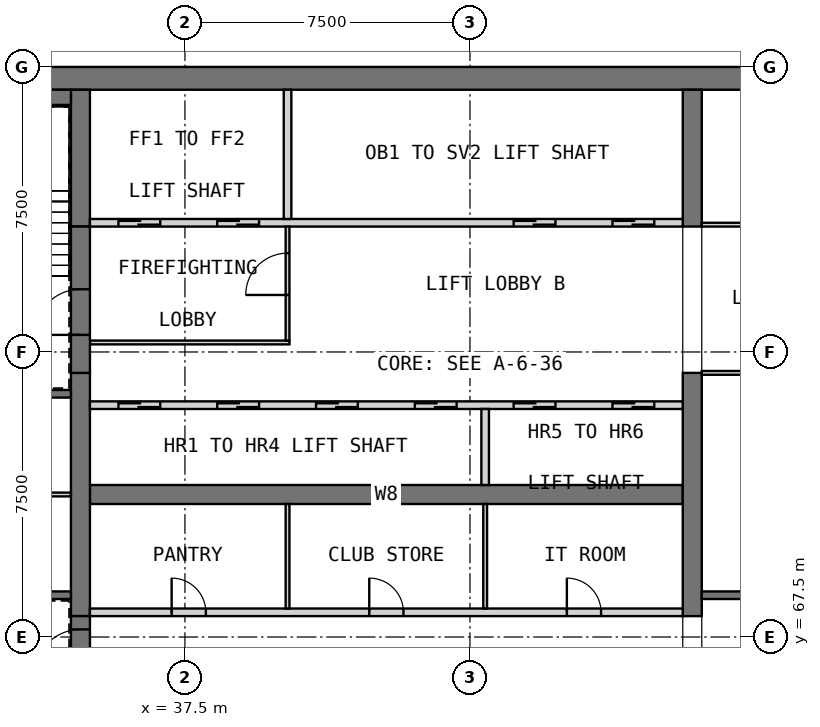
"""IFC4 building model, lengths in metres.
Left out: names, types, materials, properties, quantities, classifications, styles, units other than length and angle.
Written with IfcOpenShell. Run it as: python <this file> out.ifc"""

import sys

from ifc_helpers import new_model, si_unit, direction, frame, frame_2d, origin, place, context, subcontext, project, spatial, rectangle, extrude, element, fill, save


model = new_model("IFC4")
c1 = context("Model", 3, precision=1e-05, world=origin(), true_north=direction((0.0, 1.0)))
c2 = subcontext(c1, "Body", "Model", "MODEL_VIEW")
j1 = project(units=[si_unit("LENGTHUNIT", "METRE"), si_unit("PLANEANGLEUNIT", "RADIAN")], contexts=[c1])
p1 = place(None, origin())
s1 = spatial("IfcSite", under=j1, at=p1, CompositionType="ELEMENT")
p2 = place(p1, origin())
s2 = spatial("IfcBuilding", under=s1, at=p2, CompositionType="ELEMENT")
p3 = place(p2, frame((0.0, 0.0, 287.2)))
s3 = spatial("IfcBuildingStorey", under=s2, at=p3, CompositionType="ELEMENT", Elevation=287.2)
p4 = place(p3, frame((30.0, 82.2, 0.0), z_axis=(0.0, 0.0, 1.0), x_axis=(1.0, 0.0, 0.0)))
e1 = element("IfcWall", 1, at=p4, inside=s3, PredefinedType="SHEAR", context=c2, shape_type="SweptSolid", body=[
    extrude(rectangle(XDim=30.0, YDim=0.6, at=frame_2d((15.0, 0.0))), origin(), (0.0, 0.0, 1.0), 5.0),
])
p5 = place(p3, frame((35.0, 71.25, 0.0), z_axis=(0.0, 0.0, 1.0), x_axis=(1.0, 0.0, 0.0)))
e2 = element("IfcWall", 2, at=p5, inside=s3, PredefinedType="SHEAR", context=c2, shape_type="SweptSolid", body=[
    extrude(rectangle(XDim=15.6, YDim=0.5, at=frame_2d((7.8, 0.0))), origin(), (0.0, 0.0, 1.0), 5.0),
])
p6 = place(p3, frame((34.75, 68.05, 0.0), z_axis=(0.0, 0.0, 1.0), x_axis=(0.0, 1.0, 0.0)))
e3 = element("IfcWall", 3, at=p6, inside=s3, PredefinedType="SHEAR", context=c2, shape_type="SweptSolid", body=[
    extrude(rectangle(XDim=6.4, YDim=0.5, at=frame_2d((3.2, 0.0))), origin(), (0.0, 0.0, 1.0), 5.0),
])
p7 = place(p3, frame((34.75, 78.3, 0.0), z_axis=(0.0, 0.0, 1.0), x_axis=(0.0, 1.0, 0.0)))
e4 = element("IfcWall", 4, at=p7, inside=s3, PredefinedType="SHEAR", context=c2, shape_type="SweptSolid", body=[
    extrude(rectangle(XDim=3.6, YDim=0.5, at=frame_2d((1.8, 0.0))), origin(), (0.0, 0.0, 1.0), 5.0),
])
p8 = place(p3, frame((50.85, 68.05, 0.0), z_axis=(0.0, 0.0, 1.0), x_axis=(0.0, 1.0, 0.0)))
e5 = element("IfcWall", 5, at=p8, inside=s3, PredefinedType="SHEAR", context=c2, shape_type="SweptSolid", body=[
    extrude(rectangle(XDim=6.4, YDim=0.5, at=frame_2d((3.2, 0.0))), origin(), (0.0, 0.0, 1.0), 5.0),
])
p9 = place(p3, frame((50.85, 78.3, 0.0), z_axis=(0.0, 0.0, 1.0), x_axis=(0.0, 1.0, 0.0)))
e6 = element("IfcWall", 6, at=p9, inside=s3, PredefinedType="SHEAR", context=c2, shape_type="SweptSolid", body=[
    extrude(rectangle(XDim=3.6, YDim=0.5, at=frame_2d((1.8, 0.0))), origin(), (0.0, 0.0, 1.0), 5.0),
])
p10 = place(p3, frame((35.0, 68.15, 0.0), z_axis=(0.0, 0.0, 1.0), x_axis=(1.0, 0.0, 0.0)))
e7 = element("IfcWall", 7, at=p10, inside=s3, PredefinedType="PARTITIONING", context=c2, shape_type="SweptSolid", body=[
    extrude(rectangle(XDim=15.6, YDim=0.2, at=frame_2d((7.8, 0.0))), origin(), (0.0, 0.0, 1.0), 4.7),
])
p11 = place(p10, frame((2.15, 0.0, 0.0)))
e8 = element("IfcOpeningElement", 8, at=p11, cuts=e7, PredefinedType="OPENING", context=c2, shape_type="SweptSolid", body=[
    extrude(rectangle(XDim=0.9, YDim=2.1, at=frame_2d((0.45, 1.05))), frame((0.0, 0.11, 0.0), z_axis=(0.0, -1.0, 0.0), x_axis=(1.0, 0.0, 0.0)), (0.0, 0.0, 1.0), 0.22),
])
p12 = place(p10, frame((7.35, 0.0, 0.0)))
e9 = element("IfcOpeningElement", 9, at=p12, cuts=e7, PredefinedType="OPENING", context=c2, shape_type="SweptSolid", body=[
    extrude(rectangle(XDim=0.9, YDim=2.1, at=frame_2d((0.45, 1.05))), frame((0.0, 0.11, 0.0), z_axis=(0.0, -1.0, 0.0), x_axis=(1.0, 0.0, 0.0)), (0.0, 0.0, 1.0), 0.22),
])
p13 = place(p10, frame((12.55, 0.0, 0.0)))
e10 = element("IfcOpeningElement", 10, at=p13, cuts=e7, PredefinedType="OPENING", context=c2, shape_type="SweptSolid", body=[
    extrude(rectangle(XDim=0.9, YDim=2.1, at=frame_2d((0.45, 1.05))), frame((0.0, 0.11, 0.0), z_axis=(0.0, -1.0, 0.0), x_axis=(1.0, 0.0, 0.0)), (0.0, 0.0, 1.0), 0.22),
])
for number, where, z_axis, x_axis in (
    (11, (40.2, 68.25, 0.0), (0.0, 0.0, 1.0), (0.0, 1.0, 0.0)),
    (12, (45.4, 68.25, 0.0), (0.0, 0.0, 1.0), (0.0, 1.0, 0.0)),
):
    element("IfcWall", number, at=place(p3, frame(where, z_axis=z_axis, x_axis=x_axis)), inside=s3, PredefinedType="PARTITIONING", context=c2, shape_type="SweptSolid", body=[
        extrude(rectangle(XDim=2.75, YDim=0.1, at=frame_2d((1.375, 0.0))), origin(), (0.0, 0.0, 1.0), 4.7),
    ])
p14 = place(p3, frame((35.0, 73.6, 0.0), z_axis=(0.0, 0.0, 1.0), x_axis=(1.0, 0.0, 0.0)))
e13 = element("IfcWall", 13, at=p14, inside=s3, PredefinedType="SOLIDWALL", context=c2, shape_type="SweptSolid", body=[
    extrude(rectangle(XDim=15.6, YDim=0.2, at=frame_2d((7.8, 0.0))), origin(), (0.0, 0.0, 1.0), 5.0),
])
p15 = place(p14, frame((0.75, 0.0, 0.0)))
e14 = element("IfcOpeningElement", 14, at=p15, cuts=e13, PredefinedType="OPENING", context=c2, shape_type="SweptSolid", body=[
    extrude(rectangle(XDim=1.1, YDim=2.1, at=frame_2d((0.55, 1.05))), frame((0.0, 0.11, 0.0), z_axis=(0.0, -1.0, 0.0), x_axis=(1.0, 0.0, 0.0)), (0.0, 0.0, 1.0), 0.22),
])
p16 = place(p14, frame((3.35, 0.0, 0.0)))
e15 = element("IfcOpeningElement", 15, at=p16, cuts=e13, PredefinedType="OPENING", context=c2, shape_type="SweptSolid", body=[
    extrude(rectangle(XDim=1.1, YDim=2.1, at=frame_2d((0.55, 1.05))), frame((0.0, 0.11, 0.0), z_axis=(0.0, -1.0, 0.0), x_axis=(1.0, 0.0, 0.0)), (0.0, 0.0, 1.0), 0.22),
])
p17 = place(p14, frame((5.95, 0.0, 0.0)))
e16 = element("IfcOpeningElement", 16, at=p17, cuts=e13, PredefinedType="OPENING", context=c2, shape_type="SweptSolid", body=[
    extrude(rectangle(XDim=1.1, YDim=2.1, at=frame_2d((0.55, 1.05))), frame((0.0, 0.11, 0.0), z_axis=(0.0, -1.0, 0.0), x_axis=(1.0, 0.0, 0.0)), (0.0, 0.0, 1.0), 0.22),
])
p18 = place(p14, frame((8.55, 0.0, 0.0)))
e17 = element("IfcOpeningElement", 17, at=p18, cuts=e13, PredefinedType="OPENING", context=c2, shape_type="SweptSolid", body=[
    extrude(rectangle(XDim=1.1, YDim=2.1, at=frame_2d((0.55, 1.05))), frame((0.0, 0.11, 0.0), z_axis=(0.0, -1.0, 0.0), x_axis=(1.0, 0.0, 0.0)), (0.0, 0.0, 1.0), 0.22),
])
p19 = place(p14, frame((11.15, 0.0, 0.0)))
e18 = element("IfcOpeningElement", 18, at=p19, cuts=e13, PredefinedType="OPENING", context=c2, shape_type="SweptSolid", body=[
    extrude(rectangle(XDim=1.1, YDim=2.1, at=frame_2d((0.55, 1.05))), frame((0.0, 0.11, 0.0), z_axis=(0.0, -1.0, 0.0), x_axis=(1.0, 0.0, 0.0)), (0.0, 0.0, 1.0), 0.22),
])
p20 = place(p14, frame((13.75, 0.0, 0.0)))
e19 = element("IfcOpeningElement", 19, at=p20, cuts=e13, PredefinedType="OPENING", context=c2, shape_type="SweptSolid", body=[
    extrude(rectangle(XDim=1.1, YDim=2.1, at=frame_2d((0.55, 1.05))), frame((0.0, 0.11, 0.0), z_axis=(0.0, -1.0, 0.0), x_axis=(1.0, 0.0, 0.0)), (0.0, 0.0, 1.0), 0.22),
])
p21 = place(p3, frame((45.4, 71.5, 0.0), z_axis=(0.0, 0.0, 1.0), x_axis=(0.0, 1.0, 0.0)))
e20 = element("IfcWall", 20, at=p21, inside=s3, PredefinedType="SOLIDWALL", context=c2, shape_type="SweptSolid", body=[
    extrude(rectangle(XDim=2.0, YDim=0.2, at=frame_2d((1.0, 0.0))), origin(), (0.0, 0.0, 1.0), 5.0),
])
p22 = place(p3, frame((35.0, 78.4, 0.0), z_axis=(0.0, 0.0, 1.0), x_axis=(1.0, 0.0, 0.0)))
e21 = element("IfcWall", 21, at=p22, inside=s3, PredefinedType="SOLIDWALL", context=c2, shape_type="SweptSolid", body=[
    extrude(rectangle(XDim=15.6, YDim=0.2, at=frame_2d((7.8, 0.0))), origin(), (0.0, 0.0, 1.0), 5.0),
])
p23 = place(p22, frame((0.75, 0.0, 0.0)))
e22 = element("IfcOpeningElement", 22, at=p23, cuts=e21, PredefinedType="OPENING", context=c2, shape_type="SweptSolid", body=[
    extrude(rectangle(XDim=1.1, YDim=2.1, at=frame_2d((0.55, 1.05))), frame((0.0, 0.11, 0.0), z_axis=(0.0, -1.0, 0.0), x_axis=(1.0, 0.0, 0.0)), (0.0, 0.0, 1.0), 0.22),
])
p24 = place(p22, frame((3.35, 0.0, 0.0)))
e23 = element("IfcOpeningElement", 23, at=p24, cuts=e21, PredefinedType="OPENING", context=c2, shape_type="SweptSolid", body=[
    extrude(rectangle(XDim=1.1, YDim=2.1, at=frame_2d((0.55, 1.05))), frame((0.0, 0.11, 0.0), z_axis=(0.0, -1.0, 0.0), x_axis=(1.0, 0.0, 0.0)), (0.0, 0.0, 1.0), 0.22),
])
p25 = place(p22, frame((11.15, 0.0, 0.0)))
e24 = element("IfcOpeningElement", 24, at=p25, cuts=e21, PredefinedType="OPENING", context=c2, shape_type="SweptSolid", body=[
    extrude(rectangle(XDim=1.1, YDim=2.1, at=frame_2d((0.55, 1.05))), frame((0.0, 0.11, 0.0), z_axis=(0.0, -1.0, 0.0), x_axis=(1.0, 0.0, 0.0)), (0.0, 0.0, 1.0), 0.22),
])
p26 = place(p22, frame((13.75, 0.0, 0.0)))
e25 = element("IfcOpeningElement", 25, at=p26, cuts=e21, PredefinedType="OPENING", context=c2, shape_type="SweptSolid", body=[
    extrude(rectangle(XDim=1.1, YDim=2.1, at=frame_2d((0.55, 1.05))), frame((0.0, 0.11, 0.0), z_axis=(0.0, -1.0, 0.0), x_axis=(1.0, 0.0, 0.0)), (0.0, 0.0, 1.0), 0.22),
])
p27 = place(p3, frame((40.2, 78.5, 0.0), z_axis=(0.0, 0.0, 1.0), x_axis=(0.0, 1.0, 0.0)))
e26 = element("IfcWall", 26, at=p27, inside=s3, PredefinedType="SOLIDWALL", context=c2, shape_type="SweptSolid", body=[
    extrude(rectangle(XDim=3.4, YDim=0.2, at=frame_2d((1.7, 0.0))), origin(), (0.0, 0.0, 1.0), 5.0),
])
p28 = place(p3, frame((35.0, 75.25, 0.0), z_axis=(0.0, 0.0, 1.0), x_axis=(1.0, 0.0, 0.0)))
e27 = element("IfcWall", 27, at=p28, inside=s3, PredefinedType="PARTITIONING", context=c2, shape_type="SweptSolid", body=[
    extrude(rectangle(XDim=5.25, YDim=0.1, at=frame_2d((2.625, 0.0))), origin(), (0.0, 0.0, 1.0), 4.7),
])
p29 = place(p3, frame((40.2, 75.3, 0.0), z_axis=(0.0, 0.0, 1.0), x_axis=(0.0, 1.0, 0.0)))
e28 = element("IfcWall", 28, at=p29, inside=s3, PredefinedType="PARTITIONING", context=c2, shape_type="SweptSolid", body=[
    extrude(rectangle(XDim=3.0, YDim=0.1, at=frame_2d((1.5, 0.0))), origin(), (0.0, 0.0, 1.0), 4.7),
])
p30 = place(p29, frame((1.2, 0.0, 0.0)))
e29 = element("IfcOpeningElement", 29, at=p30, cuts=e28, PredefinedType="OPENING", context=c2, shape_type="SweptSolid", body=[
    extrude(rectangle(XDim=1.1, YDim=2.1, at=frame_2d((0.55, 1.05))), frame((0.0, 0.06, 0.0), z_axis=(0.0, -1.0, 0.0), x_axis=(1.0, 0.0, 0.0)), (0.0, 0.0, 1.0), 0.12),
])
p31 = place(p3, frame((34.75, 64.2, 0.0), z_axis=(0.0, 0.0, 1.0), x_axis=(0.0, 1.0, 0.0)))
e30 = element("IfcWall", 30, at=p31, inside=s3, PredefinedType="SOLIDWALL", context=c2, shape_type="SweptSolid", body=[
    extrude(rectangle(XDim=3.85, YDim=0.5, at=frame_2d((1.925, 0.0))), origin(), (0.0, 0.0, 1.0), 3.8),
])
p32 = place(p31, frame((2.3, 0.0, 0.0)))
e31 = element("IfcOpeningElement", 31, at=p32, cuts=e30, PredefinedType="OPENING", context=c2, shape_type="SweptSolid", body=[
    extrude(rectangle(XDim=1.2, YDim=2.1, at=frame_2d((0.6, 1.05))), frame((0.0, 0.26, 0.0), z_axis=(0.0, -1.0, 0.0), x_axis=(1.0, 0.0, 0.0)), (0.0, 0.0, 1.0), 0.52),
])
p33 = place(p3, frame((34.75, 74.45, 0.0), z_axis=(0.0, 0.0, 1.0), x_axis=(0.0, 1.0, 0.0)))
e32 = element("IfcWall", 32, at=p33, inside=s3, PredefinedType="SOLIDWALL", context=c2, shape_type="SweptSolid", body=[
    extrude(rectangle(XDim=3.85, YDim=0.5, at=frame_2d((1.925, 0.0))), origin(), (0.0, 0.0, 1.0), 3.8),
])
p34 = place(p33, frame((1.0, 0.0, 0.0)))
e33 = element("IfcOpeningElement", 33, at=p34, cuts=e32, PredefinedType="OPENING", context=c2, shape_type="SweptSolid", body=[
    extrude(rectangle(XDim=1.2, YDim=2.1, at=frame_2d((0.6, 1.05))), frame((0.0, 0.26, 0.0), z_axis=(0.0, -1.0, 0.0), x_axis=(1.0, 0.0, 0.0)), (0.0, 0.0, 1.0), 0.52),
])
p35 = place(p3, frame((30.6, 68.6, 0.0), z_axis=(0.0, 0.0, 1.0), x_axis=(1.0, 0.0, 0.0)))
e34 = element("IfcWall", 34, at=p35, inside=s3, PredefinedType="SOLIDWALL", context=c2, shape_type="SweptSolid", body=[
    extrude(rectangle(XDim=3.9, YDim=0.2, at=frame_2d((1.95, 0.0))), origin(), (0.0, 0.0, 1.0), 4.7),
])
p36 = place(p35, frame((1.7, 0.0, 0.0)))
e35 = element("IfcOpeningElement", 35, at=p36, cuts=e34, PredefinedType="OPENING", context=c2, shape_type="SweptSolid", body=[
    extrude(rectangle(XDim=0.9, YDim=2.1, at=frame_2d((0.45, 1.05))), frame((0.0, 0.11, 0.0), z_axis=(0.0, -1.0, 0.0), x_axis=(1.0, 0.0, 0.0)), (0.0, 0.0, 1.0), 0.22),
])
p37 = place(p3, frame((30.6, 73.9, 0.0), z_axis=(0.0, 0.0, 1.0), x_axis=(1.0, 0.0, 0.0)))
e36 = element("IfcWall", 36, at=p37, inside=s3, PredefinedType="SOLIDWALL", context=c2, shape_type="SweptSolid", body=[
    extrude(rectangle(XDim=3.9, YDim=0.2, at=frame_2d((1.95, 0.0))), origin(), (0.0, 0.0, 1.0), 4.7),
])
p38 = place(p37, frame((1.7, 0.0, 0.0)))
e37 = element("IfcOpeningElement", 37, at=p38, cuts=e36, PredefinedType="OPENING", context=c2, shape_type="SweptSolid", body=[
    extrude(rectangle(XDim=0.9, YDim=2.1, at=frame_2d((0.45, 1.05))), frame((0.0, 0.11, 0.0), z_axis=(0.0, -1.0, 0.0), x_axis=(1.0, 0.0, 0.0)), (0.0, 0.0, 1.0), 0.22),
])
p39 = place(p3, frame((51.1, 68.6, 0.0), z_axis=(0.0, 0.0, 1.0), x_axis=(1.0, 0.0, 0.0)))
e38 = element("IfcWall", 38, at=p39, inside=s3, PredefinedType="SOLIDWALL", context=c2, shape_type="SweptSolid", body=[
    extrude(rectangle(XDim=8.3, YDim=0.2, at=frame_2d((4.15, 0.0))), origin(), (0.0, 0.0, 1.0), 4.7),
])
p40 = place(p3, frame((31.0, 81.7, 0.0), z_axis=(0.0, 0.0, 1.0), x_axis=(1.0, 0.0, 0.0)))
e39 = element("IfcWall", 39, at=p40, inside=s3, PredefinedType="SOLIDWALL", context=c2, shape_type="SweptSolid", body=[
    extrude(rectangle(XDim=3.5, YDim=0.4, at=frame_2d((1.75, 0.0))), origin(), (0.0, 0.0, 1.0), 4.7),
])
p41 = place(p3, frame((30.6, 71.25, 0.0), z_axis=(0.0, 0.0, 1.0), x_axis=(1.0, 0.0, 0.0)))
e40 = element("IfcWall", 40, at=p41, inside=s3, PredefinedType="PARTITIONING", context=c2, shape_type="SweptSolid", body=[
    extrude(rectangle(XDim=3.9, YDim=0.1, at=frame_2d((1.95, 0.0))), origin(), (0.0, 0.0, 1.0), 4.7),
])
p42 = place(p3, frame((51.1, 74.45, 0.0), z_axis=(0.0, 0.0, 1.0), x_axis=(1.0, 0.0, 0.0)))
e41 = element("IfcWall", 41, at=p42, inside=s3, PredefinedType="PARTITIONING", context=c2, shape_type="SweptSolid", body=[
    extrude(rectangle(XDim=8.3, YDim=0.1, at=frame_2d((4.15, 0.0))), origin(), (0.0, 0.0, 1.0), 4.7),
])
p43 = place(p42, frame((3.7, 0.0, 0.0)))
e42 = element("IfcOpeningElement", 42, at=p43, cuts=e41, PredefinedType="OPENING", context=c2, shape_type="SweptSolid", body=[
    extrude(rectangle(XDim=0.9, YDim=2.1, at=frame_2d((0.45, 1.05))), frame((0.0, 0.06, 0.0), z_axis=(0.0, -1.0, 0.0), x_axis=(1.0, 0.0, 0.0)), (0.0, 0.0, 1.0), 0.12),
])
p44 = place(p3, frame((51.1, 78.35, 0.0), z_axis=(0.0, 0.0, 1.0), x_axis=(1.0, 0.0, 0.0)))
e43 = element("IfcWall", 43, at=p44, inside=s3, PredefinedType="PARTITIONING", context=c2, shape_type="SweptSolid", body=[
    extrude(rectangle(XDim=8.3, YDim=0.1, at=frame_2d((4.15, 0.0))), origin(), (0.0, 0.0, 1.0), 4.7),
])
p45 = place(p44, frame((3.7, 0.0, 0.0)))
e44 = element("IfcOpeningElement", 44, at=p45, cuts=e43, PredefinedType="OPENING", context=c2, shape_type="SweptSolid", body=[
    extrude(rectangle(XDim=0.9, YDim=2.1, at=frame_2d((0.45, 1.05))), frame((0.0, 0.06, 0.0), z_axis=(0.0, -1.0, 0.0), x_axis=(1.0, 0.0, 0.0)), (0.0, 0.0, 1.0), 0.12),
])
p46 = place(p11, origin())
e45 = element("IfcDoor", 45, at=p46, inside=s3, OperationType="SINGLE_SWING_RIGHT", PredefinedType="DOOR", context=c2, shape_type="SweptSolid", body=[
    extrude(rectangle(XDim=0.9, YDim=2.1, at=frame_2d((0.45, 1.05))), frame((0.0, 0.025, 0.0), z_axis=(0.0, -1.0, 0.0), x_axis=(1.0, 0.0, 0.0)), (0.0, 0.0, 1.0), 0.05),
])
fill(e8, e45)
p47 = place(p12, origin())
e46 = element("IfcDoor", 46, at=p47, inside=s3, OperationType="SINGLE_SWING_LEFT", PredefinedType="DOOR", context=c2, shape_type="SweptSolid", body=[
    extrude(rectangle(XDim=0.9, YDim=2.1, at=frame_2d((0.45, 1.05))), frame((0.0, 0.025, 0.0), z_axis=(0.0, -1.0, 0.0), x_axis=(1.0, 0.0, 0.0)), (0.0, 0.0, 1.0), 0.05),
])
fill(e9, e46)
p48 = place(p13, origin())
e47 = element("IfcDoor", 47, at=p48, inside=s3, OperationType="SINGLE_SWING_RIGHT", PredefinedType="DOOR", context=c2, shape_type="SweptSolid", body=[
    extrude(rectangle(XDim=0.9, YDim=2.1, at=frame_2d((0.45, 1.05))), frame((0.0, 0.025, 0.0), z_axis=(0.0, -1.0, 0.0), x_axis=(1.0, 0.0, 0.0)), (0.0, 0.0, 1.0), 0.05),
])
fill(e10, e47)
p49 = place(p15, origin())
e48 = element("IfcDoor", 48, at=p49, inside=s3, OperationType="DOUBLE_DOOR_SLIDING", PredefinedType="DOOR", context=c2, shape_type="SweptSolid", body=[
    extrude(rectangle(XDim=1.1, YDim=2.1, at=frame_2d((0.55, 1.05))), frame((0.0, 0.025, 0.0), z_axis=(0.0, -1.0, 0.0), x_axis=(1.0, 0.0, 0.0)), (0.0, 0.0, 1.0), 0.05),
])
fill(e14, e48)
p50 = place(p16, origin())
e49 = element("IfcDoor", 49, at=p50, inside=s3, OperationType="DOUBLE_DOOR_SLIDING", PredefinedType="DOOR", context=c2, shape_type="SweptSolid", body=[
    extrude(rectangle(XDim=1.1, YDim=2.1, at=frame_2d((0.55, 1.05))), frame((0.0, 0.025, 0.0), z_axis=(0.0, -1.0, 0.0), x_axis=(1.0, 0.0, 0.0)), (0.0, 0.0, 1.0), 0.05),
])
fill(e15, e49)
p51 = place(p17, origin())
e50 = element("IfcDoor", 50, at=p51, inside=s3, OperationType="DOUBLE_DOOR_SLIDING", PredefinedType="DOOR", context=c2, shape_type="SweptSolid", body=[
    extrude(rectangle(XDim=1.1, YDim=2.1, at=frame_2d((0.55, 1.05))), frame((0.0, 0.025, 0.0), z_axis=(0.0, -1.0, 0.0), x_axis=(1.0, 0.0, 0.0)), (0.0, 0.0, 1.0), 0.05),
])
fill(e16, e50)
p52 = place(p18, origin())
e51 = element("IfcDoor", 51, at=p52, inside=s3, OperationType="DOUBLE_DOOR_SLIDING", PredefinedType="DOOR", context=c2, shape_type="SweptSolid", body=[
    extrude(rectangle(XDim=1.1, YDim=2.1, at=frame_2d((0.55, 1.05))), frame((0.0, 0.025, 0.0), z_axis=(0.0, -1.0, 0.0), x_axis=(1.0, 0.0, 0.0)), (0.0, 0.0, 1.0), 0.05),
])
fill(e17, e51)
p53 = place(p19, origin())
e52 = element("IfcDoor", 52, at=p53, inside=s3, OperationType="DOUBLE_DOOR_SLIDING", PredefinedType="DOOR", context=c2, shape_type="SweptSolid", body=[
    extrude(rectangle(XDim=1.1, YDim=2.1, at=frame_2d((0.55, 1.05))), frame((0.0, 0.025, 0.0), z_axis=(0.0, -1.0, 0.0), x_axis=(1.0, 0.0, 0.0)), (0.0, 0.0, 1.0), 0.05),
])
fill(e18, e52)
p54 = place(p20, origin())
e53 = element("IfcDoor", 53, at=p54, inside=s3, OperationType="DOUBLE_DOOR_SLIDING", PredefinedType="DOOR", context=c2, shape_type="SweptSolid", body=[
    extrude(rectangle(XDim=1.1, YDim=2.1, at=frame_2d((0.55, 1.05))), frame((0.0, 0.025, 0.0), z_axis=(0.0, -1.0, 0.0), x_axis=(1.0, 0.0, 0.0)), (0.0, 0.0, 1.0), 0.05),
])
fill(e19, e53)
p55 = place(p23, origin())
e54 = element("IfcDoor", 54, at=p55, inside=s3, OperationType="DOUBLE_DOOR_SLIDING", PredefinedType="DOOR", context=c2, shape_type="SweptSolid", body=[
    extrude(rectangle(XDim=1.1, YDim=2.1, at=frame_2d((0.55, 1.05))), frame((0.0, 0.025, 0.0), z_axis=(0.0, -1.0, 0.0), x_axis=(1.0, 0.0, 0.0)), (0.0, 0.0, 1.0), 0.05),
])
fill(e22, e54)
p56 = place(p24, origin())
e55 = element("IfcDoor", 55, at=p56, inside=s3, OperationType="DOUBLE_DOOR_SLIDING", PredefinedType="DOOR", context=c2, shape_type="SweptSolid", body=[
    extrude(rectangle(XDim=1.1, YDim=2.1, at=frame_2d((0.55, 1.05))), frame((0.0, 0.025, 0.0), z_axis=(0.0, -1.0, 0.0), x_axis=(1.0, 0.0, 0.0)), (0.0, 0.0, 1.0), 0.05),
])
fill(e23, e55)
p57 = place(p25, origin())
e56 = element("IfcDoor", 56, at=p57, inside=s3, OperationType="DOUBLE_DOOR_SLIDING", PredefinedType="DOOR", context=c2, shape_type="SweptSolid", body=[
    extrude(rectangle(XDim=1.1, YDim=2.1, at=frame_2d((0.55, 1.05))), frame((0.0, 0.025, 0.0), z_axis=(0.0, -1.0, 0.0), x_axis=(1.0, 0.0, 0.0)), (0.0, 0.0, 1.0), 0.05),
])
fill(e24, e56)
p58 = place(p26, origin())
e57 = element("IfcDoor", 57, at=p58, inside=s3, OperationType="DOUBLE_DOOR_SLIDING", PredefinedType="DOOR", context=c2, shape_type="SweptSolid", body=[
    extrude(rectangle(XDim=1.1, YDim=2.1, at=frame_2d((0.55, 1.05))), frame((0.0, 0.025, 0.0), z_axis=(0.0, -1.0, 0.0), x_axis=(1.0, 0.0, 0.0)), (0.0, 0.0, 1.0), 0.05),
])
fill(e25, e57)
p59 = place(p30, origin())
e58 = element("IfcDoor", 58, at=p59, inside=s3, OperationType="SINGLE_SWING_LEFT", PredefinedType="DOOR", context=c2, shape_type="SweptSolid", body=[
    extrude(rectangle(XDim=1.1, YDim=2.1, at=frame_2d((0.55, 1.05))), frame((0.0, 0.025, 0.0), z_axis=(0.0, -1.0, 0.0), x_axis=(1.0, 0.0, 0.0)), (0.0, 0.0, 1.0), 0.05),
])
fill(e29, e58)
p60 = place(p32, origin())
e59 = element("IfcDoor", 59, at=p60, inside=s3, OperationType="SINGLE_SWING_LEFT", PredefinedType="DOOR", context=c2, shape_type="SweptSolid", body=[
    extrude(rectangle(XDim=1.2, YDim=2.1, at=frame_2d((0.6, 1.05))), frame((0.0, 0.025, 0.0), z_axis=(0.0, -1.0, 0.0), x_axis=(1.0, 0.0, 0.0)), (0.0, 0.0, 1.0), 0.05),
])
fill(e31, e59)
p61 = place(p34, origin())
e60 = element("IfcDoor", 60, at=p61, inside=s3, OperationType="SINGLE_SWING_RIGHT", PredefinedType="DOOR", context=c2, shape_type="SweptSolid", body=[
    extrude(rectangle(XDim=1.2, YDim=2.1, at=frame_2d((0.6, 1.05))), frame((0.0, 0.025, 0.0), z_axis=(0.0, -1.0, 0.0), x_axis=(1.0, 0.0, 0.0)), (0.0, 0.0, 1.0), 0.05),
])
fill(e33, e60)
save(model, sys.argv[1])
